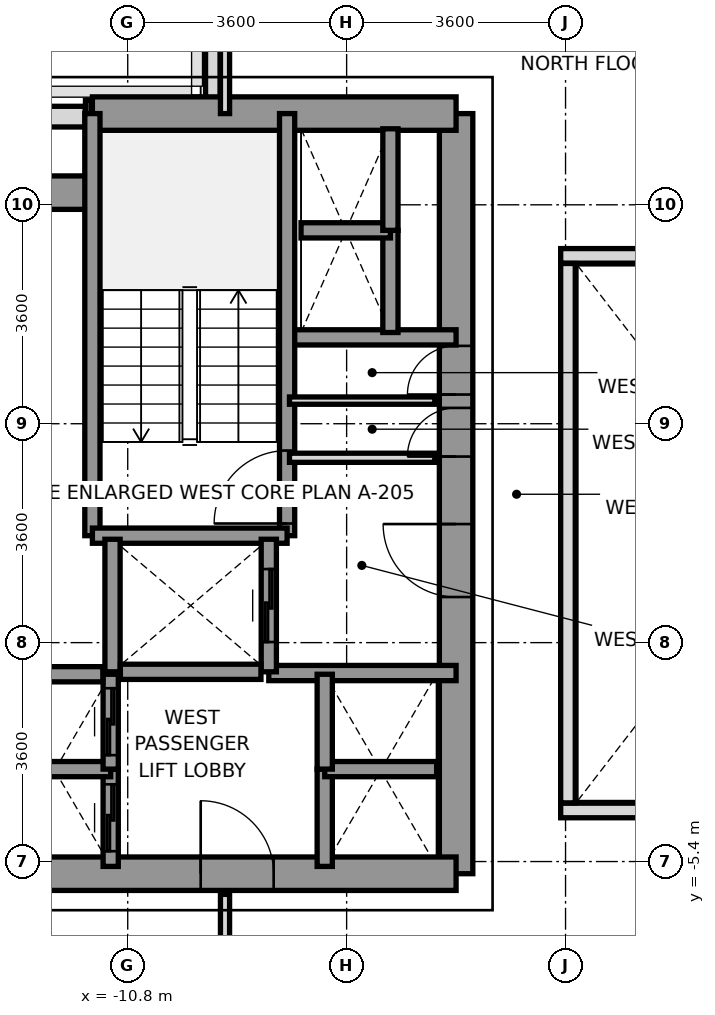
"""IFC4 building model, lengths in metres.
Left out: names, types, materials, properties, quantities, classifications, styles, units other than length and angle.
Written with IfcOpenShell. Run it as: python <this file> out.ifc"""

import sys

from ifc_helpers import new_model, si_unit, direction, frame, frame_2d, origin, place, context, subcontext, project, spatial, rectangle, extrude, source, transform, mapped, element, fill, save


model = new_model("IFC4")
c1 = context("Model", 3, precision=1e-05, world=origin(), true_north=direction((0.0, 1.0)))
c2 = subcontext(c1, "Body", "Model", "MODEL_VIEW")
j1 = project(units=[si_unit("LENGTHUNIT", "METRE"), si_unit("PLANEANGLEUNIT", "RADIAN")], contexts=[c1])
p1 = place(None, origin())
s1 = spatial("IfcSite", under=j1, at=p1, CompositionType="ELEMENT")
p2 = place(p1, origin())
s2 = spatial("IfcBuilding", under=s1, at=p2, CompositionType="ELEMENT")
p3 = place(p2, frame((0.0, 0.0, 85.0)))
s3 = spatial("IfcBuildingStorey", under=s2, at=p3, CompositionType="ELEMENT", Elevation=85.0)
p4 = place(p3, frame((-14.033, 6.85, 0.0), z_axis=(0.0, 0.0, 1.0), x_axis=(1.0, 0.0, 0.0)))
e1 = element("IfcWall", 1, at=p4, inside=s3, PredefinedType="SOLIDWALL", context=c2, shape_type="SweptSolid", body=[
    extrude(rectangle(XDim=2.535, YDim=0.34, at=frame_2d((1.268, 0.0))), origin(), (0.0, 0.0, 1.0), 3.14),
])
p5 = place(p3, frame((-11.495, 7.0, 0.0), z_axis=(0.0, 0.0, 1.0), x_axis=(1.0, 0.0, 0.0)))
e2 = element("IfcWall", 2, at=p5, inside=s3, PredefinedType="PARAPET", context=c2, shape_type="SweptSolid", body=[
    extrude(rectangle(XDim=0.092, YDim=0.24, at=frame_2d((0.046, 0.0))), origin(), (0.0, 0.0, 1.0), 1.15),
])
p6 = place(p3, frame((-9.4, 6.953, 0.0), z_axis=(0.0, 0.0, 1.0), x_axis=(0.0, 1.0, 0.0)))
e3 = element("IfcWall", 3, at=p6, inside=s3, PredefinedType="PARAPET", context=c2, shape_type="SweptSolid", body=[
    extrude(rectangle(XDim=1.444, YDim=0.24, at=frame_2d((0.722, 0.0))), origin(), (0.0, 0.0, 1.0), 1.15),
])
p7 = place(p3, frame((-5.4, -5.6, 0.0), z_axis=(0.0, 0.0, 1.0), x_axis=(0.0, 1.0, 0.0)))
e4 = element("IfcWall", 4, at=p7, inside=s3, PredefinedType="SHEAR", context=c2, shape_type="SweptSolid", body=[
    extrude(rectangle(XDim=12.5, YDim=0.55, at=frame_2d((6.25, 0.0))), origin(), (0.0, 0.0, 1.0), 3.14),
])
p8 = place(p7, frame((4.55, 0.0, 0.0)))
e5 = element("IfcOpeningElement", 5, at=p8, cuts=e4, PredefinedType="OPENING", context=c2, shape_type="SweptSolid", body=[
    extrude(rectangle(XDim=1.2, YDim=2.2, at=frame_2d((0.6, 1.1))), frame((0.0, 0.285, 0.0), z_axis=(0.0, -1.0, 0.0), x_axis=(1.0, 0.0, 0.0)), (0.0, 0.0, 1.0), 0.57),
])
p9 = place(p7, frame((6.86, 0.0, 0.0)))
e6 = element("IfcOpeningElement", 6, at=p9, cuts=e4, PredefinedType="OPENING", context=c2, shape_type="SweptSolid", body=[
    extrude(rectangle(XDim=0.8, YDim=2.1, at=frame_2d((0.4, 1.05))), frame((0.0, 0.285, 0.0), z_axis=(0.0, -1.0, 0.0), x_axis=(1.0, 0.0, 0.0)), (0.0, 0.0, 1.0), 0.57),
])
p10 = place(p7, frame((7.88, 0.0, 0.0)))
e7 = element("IfcOpeningElement", 7, at=p10, cuts=e4, PredefinedType="OPENING", context=c2, shape_type="SweptSolid", body=[
    extrude(rectangle(XDim=0.8, YDim=2.1, at=frame_2d((0.4, 1.05))), frame((0.0, 0.285, 0.0), z_axis=(0.0, -1.0, 0.0), x_axis=(1.0, 0.0, 0.0)), (0.0, 0.0, 1.0), 0.57),
])
p11 = place(p3, frame((-11.381, 6.9, 0.0), z_axis=(0.0, 0.0, 1.0), x_axis=(1.0, 0.0, 0.0)))
e8 = element("IfcWall", 8, at=p11, inside=s3, PredefinedType="SHEAR", context=c2, shape_type="SweptSolid", body=[
    extrude(rectangle(XDim=5.981, YDim=0.55, at=frame_2d((2.991, 0.0))), origin(), (0.0, 0.0, 1.0), 3.14),
])
p12 = place(p3, frame((-13.2, 5.6, 0.0), z_axis=(0.0, 0.0, 1.0), x_axis=(1.0, 0.0, 0.0)))
e9 = element("IfcWall", 9, at=p12, inside=s3, PredefinedType="SHEAR", context=c2, shape_type="SweptSolid", body=[
    extrude(rectangle(XDim=1.819, YDim=0.55, at=frame_2d((0.909, 0.0))), origin(), (0.0, 0.0, 1.0), 3.14),
])
p13 = place(p3, frame((-13.2, -5.6, 0.0), z_axis=(0.0, 0.0, 1.0), x_axis=(1.0, 0.0, 0.0)))
e10 = element("IfcWall", 10, at=p13, inside=s3, PredefinedType="SHEAR", context=c2, shape_type="SweptSolid", body=[
    extrude(rectangle(XDim=7.8, YDim=0.55, at=frame_2d((3.9, 0.0))), origin(), (0.0, 0.0, 1.0), 3.14),
])
p14 = place(p13, frame((3.6, 0.0, 0.0)))
e11 = element("IfcOpeningElement", 11, at=p14, cuts=e10, PredefinedType="OPENING", context=c2, shape_type="SweptSolid", body=[
    extrude(rectangle(XDim=1.2, YDim=2.2, at=frame_2d((0.6, 1.1))), frame((0.0, 0.285, 0.0), z_axis=(0.0, -1.0, 0.0), x_axis=(1.0, 0.0, 0.0)), (0.0, 0.0, 1.0), 0.57),
])
p15 = place(p3, frame((-8.18, 3.22, 0.0), z_axis=(0.0, 0.0, 1.0), x_axis=(1.0, 0.0, 0.0)))
e12 = element("IfcWall", 12, at=p15, inside=s3, PredefinedType="SOLIDWALL", context=c2, shape_type="SweptSolid", body=[
    extrude(rectangle(XDim=2.78, YDim=0.25, at=frame_2d((1.39, 0.0))), origin(), (0.0, 0.0, 1.0), 3.14),
])
p16 = place(p3, frame((-8.48, -2.3, 0.0), z_axis=(0.0, 0.0, 1.0), x_axis=(1.0, 0.0, 0.0)))
e13 = element("IfcWall", 13, at=p16, inside=s3, PredefinedType="SOLIDWALL", context=c2, shape_type="SweptSolid", body=[
    extrude(rectangle(XDim=3.08, YDim=0.25, at=frame_2d((1.54, 0.0))), origin(), (0.0, 0.0, 1.0), 3.14),
])
p17 = place(p3, frame((-8.179, -0.041, 0.0), z_axis=(0.0, 0.0, 1.0), x_axis=(0.0, 1.0, 0.0)))
e14 = element("IfcWall", 14, at=p17, inside=s3, PredefinedType="SOLIDWALL", context=c2, shape_type="SweptSolid", body=[
    extrude(rectangle(XDim=6.941, YDim=0.25, at=frame_2d((3.47, 0.0))), origin(), (0.0, 0.0, 1.0), 3.14),
])
p18 = place(p17, frame((0.2, 0.0, 0.0)))
e15 = element("IfcOpeningElement", 15, at=p18, cuts=e14, PredefinedType="OPENING", context=c2, shape_type="SweptSolid", body=[
    extrude(rectangle(XDim=1.2, YDim=2.2, at=frame_2d((0.6, 1.1))), frame((0.0, 0.135, 0.0), z_axis=(0.0, -1.0, 0.0), x_axis=(1.0, 0.0, 0.0)), (0.0, 0.0, 1.0), 0.27),
])
p19 = place(p3, frame((-11.381, -0.041, 0.0), z_axis=(0.0, 0.0, 1.0), x_axis=(0.0, 1.0, 0.0)))
e16 = element("IfcWall", 16, at=p19, inside=s3, PredefinedType="SOLIDWALL", context=c2, shape_type="SweptSolid", body=[
    extrude(rectangle(XDim=6.941, YDim=0.25, at=frame_2d((3.47, 0.0))), origin(), (0.0, 0.0, 1.0), 3.14),
])
p20 = place(p3, frame((-11.381, -0.041, 0.0), z_axis=(0.0, 0.0, 1.0), x_axis=(1.0, 0.0, 0.0)))
e17 = element("IfcWall", 17, at=p20, inside=s3, PredefinedType="SOLIDWALL", context=c2, shape_type="SweptSolid", body=[
    extrude(rectangle(XDim=3.202, YDim=0.25, at=frame_2d((1.601, 0.0))), origin(), (0.0, 0.0, 1.0), 3.14),
])
p21 = place(p3, frame((-11.05, -2.28, 0.0), z_axis=(0.0, 0.0, 1.0), x_axis=(0.0, 1.0, 0.0)))
e18 = element("IfcWall", 18, at=p21, inside=s3, PredefinedType="SOLIDWALL", context=c2, shape_type="SweptSolid", body=[
    extrude(rectangle(XDim=2.18, YDim=0.25, at=frame_2d((1.09, 0.0))), origin(), (0.0, 0.0, 1.0), 3.14),
])
p22 = place(p3, frame((-8.48, -2.28, 0.0), z_axis=(0.0, 0.0, 1.0), x_axis=(0.0, 1.0, 0.0)))
e19 = element("IfcWall", 19, at=p22, inside=s3, PredefinedType="SOLIDWALL", context=c2, shape_type="SweptSolid", body=[
    extrude(rectangle(XDim=2.18, YDim=0.25, at=frame_2d((1.09, 0.0))), origin(), (0.0, 0.0, 1.0), 3.14),
])
p23 = place(p22, frame((0.49, 0.0, 0.0)))
e20 = element("IfcOpeningElement", 20, at=p23, cuts=e19, PredefinedType="OPENING", context=c2, shape_type="SweptSolid", body=[
    extrude(rectangle(XDim=1.2, YDim=2.2, at=frame_2d((0.6, 1.1))), frame((0.0, 0.135, 0.0), z_axis=(0.0, -1.0, 0.0), x_axis=(1.0, 0.0, 0.0)), (0.0, 0.0, 1.0), 0.27),
])
p24 = place(p3, frame((-10.921, -2.28, 0.0), z_axis=(0.0, 0.0, 1.0), x_axis=(1.0, 0.0, 0.0)))
e21 = element("IfcWall", 21, at=p24, inside=s3, PredefinedType="SOLIDWALL", context=c2, shape_type="SweptSolid", body=[
    extrude(rectangle(XDim=2.312, YDim=0.25, at=frame_2d((1.156, 0.0))), origin(), (0.0, 0.0, 1.0), 3.14),
])
p25 = place(p3, frame((-11.08, -5.48, 0.0), z_axis=(0.0, 0.0, 1.0), x_axis=(0.0, 1.0, 0.0)))
e22 = element("IfcWall", 22, at=p25, inside=s3, PredefinedType="SOLIDWALL", context=c2, shape_type="SweptSolid", body=[
    extrude(rectangle(XDim=1.6, YDim=0.25, at=frame_2d((0.8, 0.0))), origin(), (0.0, 0.0, 1.0), 3.14),
])
p26 = place(p25, frame((0.25, 0.0, 0.0)))
e23 = element("IfcOpeningElement", 23, at=p26, cuts=e22, PredefinedType="OPENING", context=c2, shape_type="SweptSolid", body=[
    extrude(rectangle(XDim=1.1, YDim=2.2, at=frame_2d((0.55, 1.1))), frame((0.0, 0.135, 0.0), z_axis=(0.0, -1.0, 0.0), x_axis=(1.0, 0.0, 0.0)), (0.0, 0.0, 1.0), 0.27),
])
p27 = place(p3, frame((-12.92, -3.88, 0.0), z_axis=(0.0, 0.0, 1.0), x_axis=(1.0, 0.0, 0.0)))
e24 = element("IfcWall", 24, at=p27, inside=s3, PredefinedType="SOLIDWALL", context=c2, shape_type="SweptSolid", body=[
    extrude(rectangle(XDim=1.84, YDim=0.25, at=frame_2d((0.92, 0.0))), origin(), (0.0, 0.0, 1.0), 3.14),
])
p28 = place(p3, frame((-11.08, -3.88, 0.0), z_axis=(0.0, 0.0, 1.0), x_axis=(0.0, 1.0, 0.0)))
e25 = element("IfcWall", 25, at=p28, inside=s3, PredefinedType="SOLIDWALL", context=c2, shape_type="SweptSolid", body=[
    extrude(rectangle(XDim=1.56, YDim=0.25, at=frame_2d((0.78, 0.0))), origin(), (0.0, 0.0, 1.0), 3.14),
])
p29 = place(p28, frame((0.23, 0.0, 0.0)))
e26 = element("IfcOpeningElement", 26, at=p29, cuts=e25, PredefinedType="OPENING", context=c2, shape_type="SweptSolid", body=[
    extrude(rectangle(XDim=1.1, YDim=2.2, at=frame_2d((0.55, 1.1))), frame((0.0, 0.135, 0.0), z_axis=(0.0, -1.0, 0.0), x_axis=(1.0, 0.0, 0.0)), (0.0, 0.0, 1.0), 0.27),
])
p30 = place(p3, frame((-12.791, -2.32, 0.0), z_axis=(0.0, 0.0, 1.0), x_axis=(1.0, 0.0, 0.0)))
e27 = element("IfcWall", 27, at=p30, inside=s3, PredefinedType="SOLIDWALL", context=c2, shape_type="SweptSolid", body=[
    extrude(rectangle(XDim=1.582, YDim=0.25, at=frame_2d((0.791, 0.0))), origin(), (0.0, 0.0, 1.0), 3.14),
])
p31 = place(p3, frame((-7.56, -5.48, 0.0), z_axis=(0.0, 0.0, 1.0), x_axis=(0.0, 1.0, 0.0)))
e28 = element("IfcWall", 28, at=p31, inside=s3, PredefinedType="SOLIDWALL", context=c2, shape_type="SweptSolid", body=[
    extrude(rectangle(XDim=1.6, YDim=0.25, at=frame_2d((0.8, 0.0))), origin(), (0.0, 0.0, 1.0), 3.14),
])
p32 = place(p3, frame((-7.56, -3.88, 0.0), z_axis=(0.0, 0.0, 1.0), x_axis=(1.0, 0.0, 0.0)))
e29 = element("IfcWall", 29, at=p32, inside=s3, PredefinedType="SOLIDWALL", context=c2, shape_type="SweptSolid", body=[
    extrude(rectangle(XDim=1.84, YDim=0.25, at=frame_2d((0.92, 0.0))), origin(), (0.0, 0.0, 1.0), 3.14),
])
p33 = place(p3, frame((-7.56, -3.88, 0.0), z_axis=(0.0, 0.0, 1.0), x_axis=(0.0, 1.0, 0.0)))
e30 = element("IfcWall", 30, at=p33, inside=s3, PredefinedType="SOLIDWALL", context=c2, shape_type="SweptSolid", body=[
    extrude(rectangle(XDim=1.56, YDim=0.25, at=frame_2d((0.78, 0.0))), origin(), (0.0, 0.0, 1.0), 3.14),
])
p34 = place(p3, frame((-6.48, 3.3, 0.0), z_axis=(0.0, 0.0, 1.0), x_axis=(0.0, 1.0, 0.0)))
e31 = element("IfcWall", 31, at=p34, inside=s3, PredefinedType="SOLIDWALL", context=c2, shape_type="SweptSolid", body=[
    extrude(rectangle(XDim=1.68, YDim=0.25, at=frame_2d((0.84, 0.0))), origin(), (0.0, 0.0, 1.0), 3.14),
])
p35 = place(p3, frame((-7.95, 4.98, 0.0), z_axis=(0.0, 0.0, 1.0), x_axis=(1.0, 0.0, 0.0)))
e32 = element("IfcWall", 32, at=p35, inside=s3, PredefinedType="SOLIDWALL", context=c2, shape_type="SweptSolid", body=[
    extrude(rectangle(XDim=1.47, YDim=0.25, at=frame_2d((0.735, 0.0))), origin(), (0.0, 0.0, 1.0), 3.14),
])
p36 = place(p3, frame((-6.48, 4.98, 0.0), z_axis=(0.0, 0.0, 1.0), x_axis=(0.0, 1.0, 0.0)))
e33 = element("IfcWall", 33, at=p36, inside=s3, PredefinedType="SOLIDWALL", context=c2, shape_type="SweptSolid", body=[
    extrude(rectangle(XDim=1.67, YDim=0.25, at=frame_2d((0.835, 0.0))), origin(), (0.0, 0.0, 1.0), 3.14),
])
p37 = place(p3, frame((-8.14, 1.24, 0.0), z_axis=(0.0, 0.0, 1.0), x_axis=(1.0, 0.0, 0.0)))
e34 = element("IfcWall", 34, at=p37, inside=s3, PredefinedType="PARTITIONING", context=c2, shape_type="SweptSolid", body=[
    extrude(rectangle(XDim=2.39, YDim=0.15, at=frame_2d((1.195, 0.0))), origin(), (0.0, 0.0, 1.0), 2.24),
])
p38 = place(p3, frame((-8.14, 2.18, 0.0), z_axis=(0.0, 0.0, 1.0), x_axis=(1.0, 0.0, 0.0)))
e35 = element("IfcWall", 35, at=p38, inside=s3, PredefinedType="PARTITIONING", context=c2, shape_type="SweptSolid", body=[
    extrude(rectangle(XDim=2.39, YDim=0.12, at=frame_2d((1.195, 0.0))), origin(), (0.0, 0.0, 1.0), 2.24),
])
p39 = place(p3, frame((-9.2, 6.9, 0.0), z_axis=(0.0, 0.0, 1.0), x_axis=(0.0, 1.0, 0.0)))
e36 = element("IfcWall", 36, at=p39, inside=s3, PredefinedType="PARTITIONING", context=c2, shape_type="SweptSolid", body=[
    extrude(rectangle(XDim=8.78, YDim=0.15, at=frame_2d((4.39, 0.0))), origin(), (0.0, 0.0, 1.0), 2.59),
])
p40 = place(p3, frame((-9.2, -15.68, 0.0), z_axis=(0.0, 0.0, 1.0), x_axis=(0.0, 1.0, 0.0)))
e37 = element("IfcWall", 37, at=p40, inside=s3, PredefinedType="PARTITIONING", context=c2, shape_type="SweptSolid", body=[
    extrude(rectangle(XDim=9.74, YDim=0.15, at=frame_2d((4.87, 0.0))), origin(), (0.0, 0.0, 1.0), 2.59),
])
for number, where, z_axis, x_axis in (
    (38, (-3.68, -4.56, 0.0), (0.0, 0.0, 1.0), (1.0, 0.0, 0.0)),
    (39, (-3.68, 4.56, 0.0), (0.0, 0.0, 1.0), (1.0, 0.0, 0.0)),
):
    element("IfcWall", number, at=place(p3, frame(where, z_axis=z_axis, x_axis=x_axis)), inside=s3, PredefinedType="PARAPET", context=c2, shape_type="SweptSolid", body=[
        extrude(rectangle(XDim=7.36, YDim=0.24, at=frame_2d((3.68, 0.0))), origin(), (0.0, 0.0, 1.0), 1.15),
    ])
p41 = place(p3, frame((-3.56, -4.435, 0.0), z_axis=(0.0, 0.0, 1.0), x_axis=(0.0, 1.0, 0.0)))
e40 = element("IfcWall", 40, at=p41, inside=s3, PredefinedType="PARAPET", context=c2, shape_type="SweptSolid", body=[
    extrude(rectangle(XDim=8.87, YDim=0.24, at=frame_2d((4.435, 0.0))), origin(), (0.0, 0.0, 1.0), 1.15),
])
m1 = source(origin(), c2, "Body", "SweptSolid", [
    extrude(rectangle(XDim=1.2, YDim=2.2, at=frame_2d((0.6, 1.1))), frame((0.0, 0.025, 0.0), z_axis=(0.0, -1.0, 0.0), x_axis=(1.0, 0.0, 0.0)), (0.0, 0.0, 1.0), 0.05),
])
p42 = place(p18, origin())
e41 = element("IfcDoor", 41, at=p42, inside=s3, OperationType="SINGLE_SWING_LEFT", PredefinedType="DOOR", context=c2, shape_type="MappedRepresentation", body=[
    mapped(m1, transform((0.0, 0.0, 0.0), x_axis=(1.0, 0.0, 0.0), y_axis=(0.0, 1.0, 0.0), z_axis=(0.0, 0.0, 1.0), scale=1.0)),
])
fill(e15, e41)
p43 = place(p8, origin())
e42 = element("IfcDoor", 42, at=p43, inside=s3, OperationType="SINGLE_SWING_RIGHT", PredefinedType="DOOR", context=c2, shape_type="MappedRepresentation", body=[
    mapped(m1, transform((0.0, 0.0, 0.0), x_axis=(1.0, 0.0, 0.0), y_axis=(0.0, 1.0, 0.0), z_axis=(0.0, 0.0, 1.0), scale=1.0)),
])
fill(e5, e42)
p44 = place(p14, origin())
e43 = element("IfcDoor", 43, at=p44, inside=s3, OperationType="SINGLE_SWING_LEFT", PredefinedType="DOOR", context=c2, shape_type="MappedRepresentation", body=[
    mapped(m1, transform((0.0, 0.0, 0.0), x_axis=(1.0, 0.0, 0.0), y_axis=(0.0, 1.0, 0.0), z_axis=(0.0, 0.0, 1.0), scale=1.0)),
])
fill(e11, e43)
m2 = source(origin(), c2, "Body", "SweptSolid", [
    extrude(rectangle(XDim=0.8, YDim=2.1, at=frame_2d((0.4, 1.05))), frame((0.0, 0.025, 0.0), z_axis=(0.0, -1.0, 0.0), x_axis=(1.0, 0.0, 0.0)), (0.0, 0.0, 1.0), 0.05),
])
p45 = place(p9, origin())
e44 = element("IfcDoor", 44, at=p45, inside=s3, OperationType="SINGLE_SWING_LEFT", PredefinedType="DOOR", context=c2, shape_type="MappedRepresentation", body=[
    mapped(m2, transform((0.0, 0.0, 0.0), x_axis=(1.0, 0.0, 0.0), y_axis=(0.0, 1.0, 0.0), z_axis=(0.0, 0.0, 1.0), scale=1.0)),
])
fill(e6, e44)
p46 = place(p10, origin())
e45 = element("IfcDoor", 45, at=p46, inside=s3, OperationType="SINGLE_SWING_LEFT", PredefinedType="DOOR", context=c2, shape_type="MappedRepresentation", body=[
    mapped(m2, transform((0.0, 0.0, 0.0), x_axis=(1.0, 0.0, 0.0), y_axis=(0.0, 1.0, 0.0), z_axis=(0.0, 0.0, 1.0), scale=1.0)),
])
fill(e7, e45)
p47 = place(p23, origin())
e46 = element("IfcDoor", 46, at=p47, inside=s3, OperationType="SLIDING_TO_RIGHT", PredefinedType="DOOR", context=c2, shape_type="MappedRepresentation", body=[
    mapped(m1, transform((0.0, 0.0, 0.0), x_axis=(1.0, 0.0, 0.0), y_axis=(0.0, 1.0, 0.0), z_axis=(0.0, 0.0, 1.0), scale=1.0)),
])
fill(e20, e46)
m3 = source(origin(), c2, "Body", "SweptSolid", [
    extrude(rectangle(XDim=1.1, YDim=2.2, at=frame_2d((0.55, 1.1))), frame((0.0, 0.025, 0.0), z_axis=(0.0, -1.0, 0.0), x_axis=(1.0, 0.0, 0.0)), (0.0, 0.0, 1.0), 0.05),
])
p48 = place(p26, origin())
e47 = element("IfcDoor", 47, at=p48, inside=s3, OperationType="SLIDING_TO_LEFT", PredefinedType="DOOR", context=c2, shape_type="MappedRepresentation", body=[
    mapped(m3, transform((0.0, 0.0, 0.0), x_axis=(1.0, 0.0, 0.0), y_axis=(0.0, 1.0, 0.0), z_axis=(0.0, 0.0, 1.0), scale=1.0)),
])
fill(e23, e47)
p49 = place(p29, origin())
e48 = element("IfcDoor", 48, at=p49, inside=s3, OperationType="SLIDING_TO_LEFT", PredefinedType="DOOR", context=c2, shape_type="MappedRepresentation", body=[
    mapped(m3, transform((0.0, 0.0, 0.0), x_axis=(1.0, 0.0, 0.0), y_axis=(0.0, 1.0, 0.0), z_axis=(0.0, 0.0, 1.0), scale=1.0)),
])
fill(e26, e48)
save(model, sys.argv[1])
